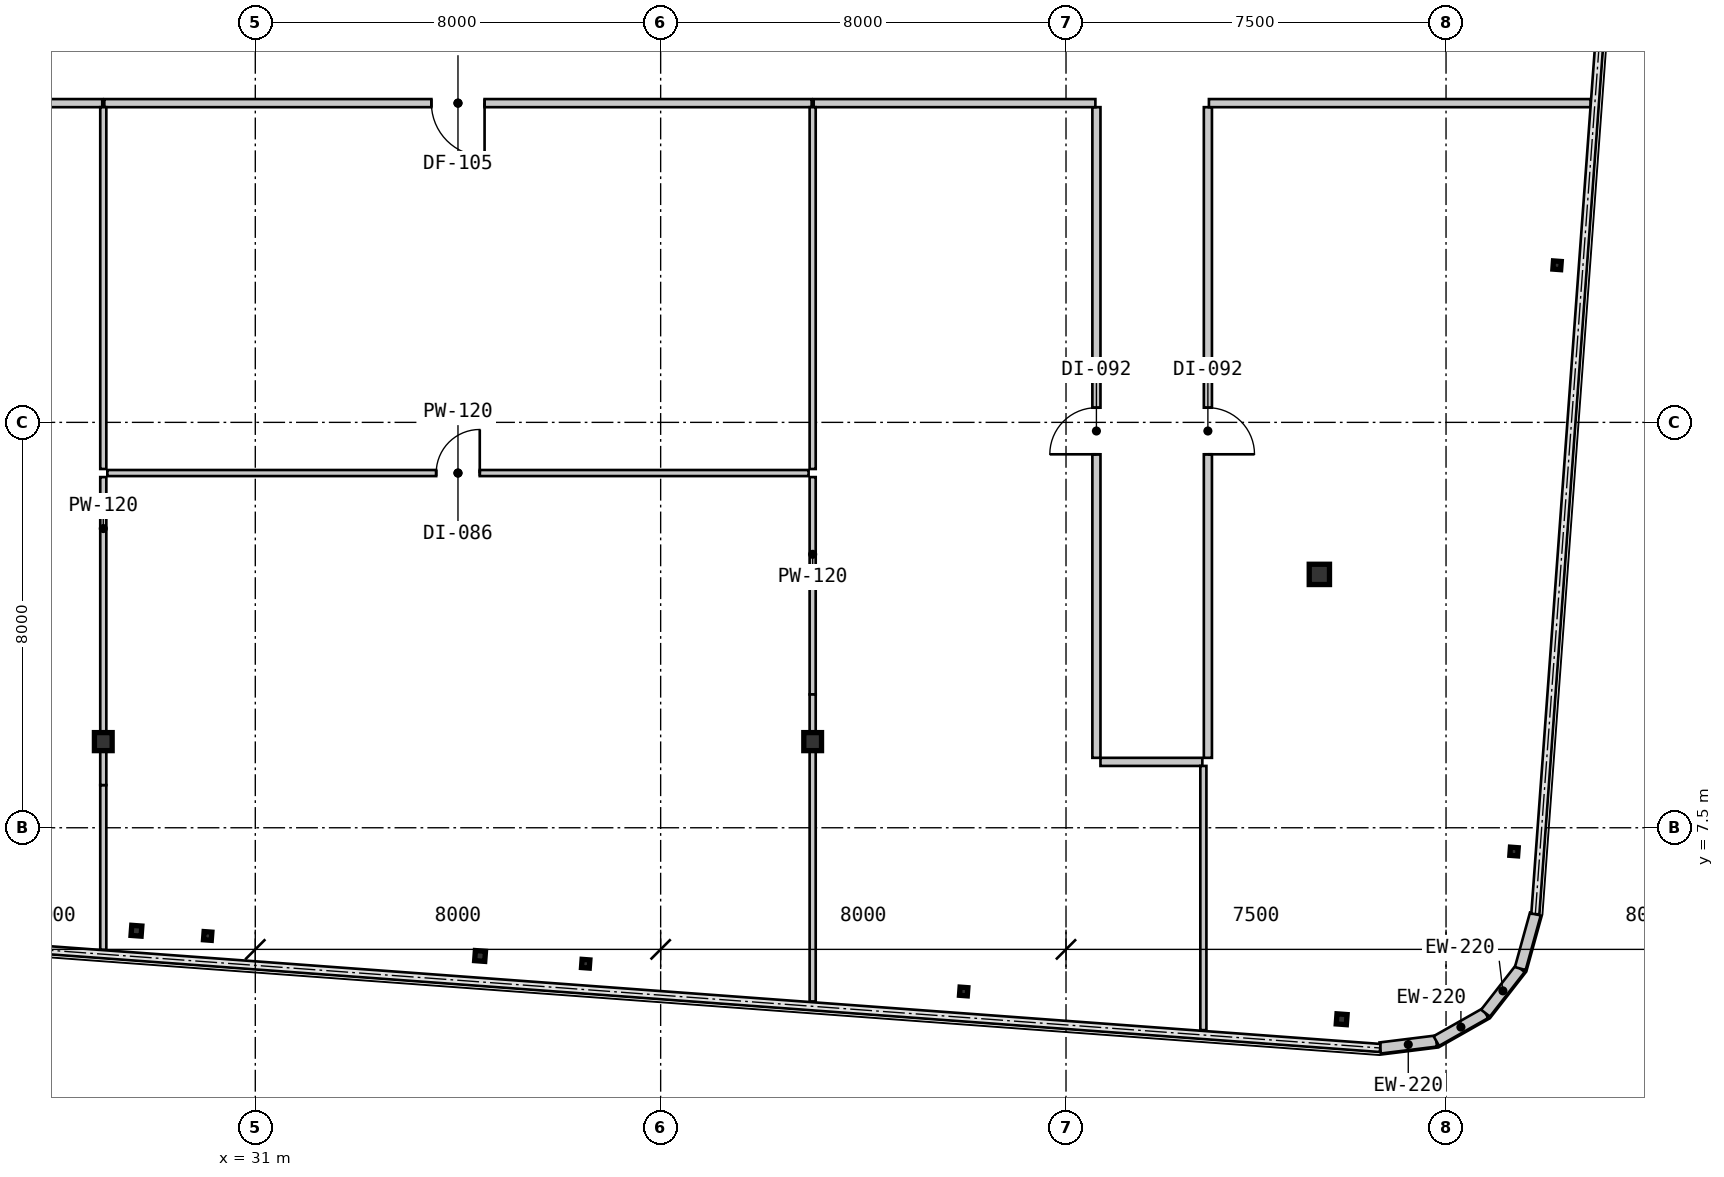
"""IFC4 building model, lengths in metres.
Left out: names, types, materials, properties, quantities, classifications, styles, units other than length and angle.
Written with IfcOpenShell. Run it as: python <this file> out.ifc"""

import sys

from ifc_helpers import new_model, si_unit, direction, frame, frame_2d, origin, origin_2d, place, context, subcontext, project, spatial, rectangle, hollow_rectangle, i_section, extrude, source, transform, mapped, element, fill, save


model = new_model("IFC4")
c1 = context("Model", 3, precision=1e-05, world=origin(), true_north=direction((0.0, 1.0)))
c2 = subcontext(c1, "Body", "Model", "MODEL_VIEW")
j1 = project(units=[si_unit("LENGTHUNIT", "METRE"), si_unit("PLANEANGLEUNIT", "RADIAN")], contexts=[c1])
p1 = place(None, origin())
s1 = spatial("IfcSite", under=j1, at=p1, CompositionType="ELEMENT")
p2 = place(p1, origin())
s2 = spatial("IfcBuilding", under=s1, at=p2, CompositionType="ELEMENT")
p3 = place(p2, frame((0.0, 0.0, 236.6)))
s3 = spatial("IfcBuildingStorey", under=s2, at=p3, CompositionType="ELEMENT", Elevation=236.6)
m1 = source(origin(), c2, "Body", "SweptSolid", [
    extrude(i_section(OverallWidth=0.35, OverallDepth=0.356, WebThickness=0.018, FlangeThickness=0.028, at=origin_2d()), origin(), (0.0, 0.0, 1.0), 3.15),
])
for number, where, z_axis, x_axis in (
    (1, (28.0, 9.2, 0.0), (0.0, 0.0, 1.0), (1.0, 0.0, 0.0)),
    (2, (42.0, 9.2, 0.0), (0.0, 0.0, 1.0), (1.0, 0.0, 0.0)),
):
    element("IfcColumn", number, at=place(p3, frame(where, z_axis=z_axis, x_axis=x_axis)), inside=s3, PredefinedType="COLUMN", context=c2, shape_type="MappedRepresentation", body=[
        mapped(m1, transform((0.0, 0.0, 0.0), scale=1.0)),
    ])
m2 = source(origin(), c2, "Body", "SweptSolid", [
    extrude(hollow_rectangle(XDim=0.4, YDim=0.4, WallThickness=0.016, at=origin_2d()), origin(), (0.0, 0.0, 1.0), 3.15),
])
p4 = place(p3, frame((52.0, 12.5, 0.0), z_axis=(0.0, 0.0, 1.0), x_axis=(1.0, 0.0, 0.0)))
e3 = element("IfcColumn", 3, at=p4, inside=s3, PredefinedType="COLUMN", context=c2, shape_type="MappedRepresentation", body=[
    mapped(m2, transform((0.0, 0.0, 0.0), scale=1.0)),
])
m3 = source(origin(), c2, "Body", "SweptSolid", [
    extrude(i_section(OverallWidth=0.154, OverallDepth=0.162, WebThickness=0.008, FlangeThickness=0.011, at=origin_2d()), origin(), (0.0, 0.0, 1.0), 3.15),
])
for number, where, z_axis, x_axis in (
    (4, (30.061, 5.365, 0.0), (0.0, 0.0, 1.0), (0.997, -0.073, 0.0)),
    (5, (37.521, 4.817, 0.0), (0.0, 0.0, 1.0), (0.997, -0.073, 0.0)),
    (6, (44.98, 4.269, 0.0), (0.0, 0.0, 1.0), (0.997, -0.073, 0.0)),
):
    element("IfcColumn", number, at=place(p3, frame(where, z_axis=z_axis, x_axis=x_axis)), inside=s3, PredefinedType="COLUMN", context=c2, shape_type="MappedRepresentation", body=[
        mapped(m3, transform((0.0, 0.0, 0.0), scale=1.0)),
    ])
m4 = source(origin(), c2, "Body", "SweptSolid", [
    extrude(hollow_rectangle(XDim=0.2, YDim=0.2, WallThickness=0.009, at=origin_2d()), origin(), (0.0, 0.0, 1.0), 3.15),
])
p5 = place(p3, frame((52.44, 3.721, 0.0), z_axis=(0.0, 0.0, 1.0), x_axis=(0.997314477224, -0.073238197128, 0.0)))
e7 = element("IfcColumn", 7, at=p5, inside=s3, PredefinedType="COLUMN", context=c2, shape_type="MappedRepresentation", body=[
    mapped(m4, transform((0.0, 0.0, 0.0), scale=1.0)),
])
for number, where, z_axis, x_axis in (
    (8, (55.842, 7.031, 0.0), (0.0, 0.0, 1.0), (0.997, -0.073, 0.0)),
    (9, (56.691, 18.6, 0.0), (0.0, 0.0, 1.0), (0.997, -0.073, 0.0)),
):
    element("IfcColumn", number, at=place(p3, frame(where, z_axis=z_axis, x_axis=x_axis)), inside=s3, PredefinedType="COLUMN", context=c2, shape_type="MappedRepresentation", body=[
        mapped(m3, transform((0.0, 0.0, 0.0), scale=1.0)),
    ])
for number, where, z_axis, x_axis in (
    (10, (28.654, 5.468, 0.0), (0.0, 0.0, 1.0), (0.997, -0.073, 0.0)),
    (11, (35.436, 4.97, 0.0), (0.0, 0.0, 1.0), (0.997, -0.073, 0.0)),
):
    element("IfcColumn", number, at=place(p3, frame(where, z_axis=z_axis, x_axis=x_axis)), inside=s3, PredefinedType="COLUMN", context=c2, shape_type="MappedRepresentation", body=[
        mapped(m4, transform((0.0, 0.0, 0.0), scale=1.0)),
    ])
m5 = source(origin(), c2, "Body", "SweptSolid", [
    extrude(rectangle(XDim=1.116, YDim=0.22, at=frame_2d((0.558, 0.0))), origin(), (0.0, 0.0, 1.0), 2.93),
])
p6 = place(p3, frame((53.201, 3.154, 0.0), z_axis=(0.0, 0.0, 1.0), x_axis=(0.992438604032, 0.122742076028, 0.0)))
e12 = element("IfcWall", 12, at=p6, inside=s3, PredefinedType="SOLIDWALL", context=c2, shape_type="MappedRepresentation", body=[
    mapped(m5, transform((0.0, 0.0, 0.0), scale=1.0)),
])
m6 = source(origin(), c2, "Body", "SweptSolid", [
    extrude(rectangle(XDim=1.116, YDim=0.22, at=frame_2d((0.558, 0.0))), origin(), (0.0, 0.0, 1.0), 2.93),
])
p7 = place(p3, frame((54.308, 3.291, 0.0), z_axis=(0.0, 0.0, 1.0), x_axis=(0.869893934693, 0.49323882895, 0.0)))
e13 = element("IfcWall", 13, at=p7, inside=s3, PredefinedType="SOLIDWALL", context=c2, shape_type="MappedRepresentation", body=[
    mapped(m6, transform((0.0, 0.0, 0.0), scale=1.0)),
])
for number, where, z_axis, x_axis in (
    (14, (55.279, 3.841, 0.0), (0.0, 0.0, 1.0), (0.615, 0.789, 0.0)),
    (15, (55.965, 4.721, 0.0), (0.0, 0.0, 1.0), (0.266, 0.964, 0.0)),
):
    element("IfcWall", number, at=place(p3, frame(where, z_axis=z_axis, x_axis=x_axis)), inside=s3, PredefinedType="SOLIDWALL", context=c2, shape_type="MappedRepresentation", body=[
        mapped(m5, transform((0.0, 0.0, 0.0), scale=1.0)),
    ])
m7 = source(origin(), c2, "Body", "SweptSolid", [
    extrude(rectangle(XDim=13.959, YDim=0.16, at=frame_2d((6.98, 0.0))), origin(), (0.0, 0.0, 1.0), 2.93),
])
p8 = place(p3, frame((41.98, 21.8, 0.0), z_axis=(0.0, 0.0, 1.0), x_axis=(-1.0, 0.0, 0.0)))
e16 = element("IfcWall", 16, at=p8, inside=s3, PredefinedType="PARTITIONING", context=c2, shape_type="MappedRepresentation", body=[
    mapped(m7, transform((0.0, 0.0, 0.0), scale=1.0)),
])
m8 = source(origin(), c2, "Body", "SweptSolid", [
    extrude(rectangle(XDim=1.05, YDim=2.1, at=frame_2d((0.525, 1.05))), frame((0.0, 0.09, 0.0), z_axis=(0.0, -1.0, 0.0), x_axis=(1.0, 0.0, 0.0)), (0.0, 0.0, 1.0), 0.18),
])
p9 = place(p8, frame((6.455, 0.0, 0.0)))
e17 = element("IfcOpeningElement", 17, at=p9, cuts=e16, PredefinedType="OPENING", context=c2, shape_type="MappedRepresentation", body=[
    mapped(m8, transform((0.0, 0.0, 0.0), scale=1.0)),
])
m9 = source(origin(), c2, "Body", "SweptSolid", [
    extrude(rectangle(XDim=5.559, YDim=0.16, at=frame_2d((2.78, 0.0))), origin(), (0.0, 0.0, 1.0), 2.93),
])
p10 = place(p3, frame((27.98, 21.8, 0.0), z_axis=(0.0, 0.0, 1.0), x_axis=(-1.0, 0.0, 0.0)))
e18 = element("IfcWall", 18, at=p10, inside=s3, PredefinedType="PARTITIONING", context=c2, shape_type="MappedRepresentation", body=[
    mapped(m9, transform((0.0, 0.0, 0.0), scale=1.0)),
])
m10 = source(origin(), c2, "Body", "SweptSolid", [
    extrude(rectangle(XDim=12.84, YDim=0.16, at=frame_2d((6.42, 0.0))), origin(), (0.0, 0.0, 1.0), 2.93),
])
p11 = place(p3, frame((47.6, 8.88, 0.0), z_axis=(0.0, 0.0, 1.0), x_axis=(0.0, 1.0, 0.0)))
e19 = element("IfcWall", 19, at=p11, inside=s3, PredefinedType="PARTITIONING", context=c2, shape_type="MappedRepresentation", body=[
    mapped(m10, transform((0.0, 0.0, 0.0), scale=1.0)),
])
m11 = source(origin(), c2, "Body", "SweptSolid", [
    extrude(rectangle(XDim=0.92, YDim=2.1, at=frame_2d((0.46, 1.05))), frame((0.0, 0.09, 0.0), z_axis=(0.0, -1.0, 0.0), x_axis=(1.0, 0.0, 0.0)), (0.0, 0.0, 1.0), 0.18),
])
p12 = place(p11, frame((5.99, 0.0, 0.0)))
e20 = element("IfcOpeningElement", 20, at=p12, cuts=e19, PredefinedType="OPENING", context=c2, shape_type="MappedRepresentation", body=[
    mapped(m11, transform((0.0, 0.0, 0.0), scale=1.0)),
])
p13 = place(p3, frame((47.58, 21.8, 0.0), z_axis=(0.0, 0.0, 1.0), x_axis=(-1.0, 0.0, 0.0)))
e21 = element("IfcWall", 21, at=p13, inside=s3, PredefinedType="PARTITIONING", context=c2, shape_type="MappedRepresentation", body=[
    mapped(m9, transform((0.0, 0.0, 0.0), scale=1.0)),
])
m12 = source(origin(), c2, "Body", "SweptSolid", [
    extrude(rectangle(XDim=2.011, YDim=0.16, at=frame_2d((1.005, 0.0))), origin(), (0.0, 0.0, 1.0), 2.93),
])
p14 = place(p3, frame((49.691, 8.8, 0.0), z_axis=(0.0, 0.0, 1.0), x_axis=(-1.0, 0.0, 0.0)))
e22 = element("IfcWall", 22, at=p14, inside=s3, PredefinedType="PARTITIONING", context=c2, shape_type="MappedRepresentation", body=[
    mapped(m12, transform((0.0, 0.0, 0.0), scale=1.0)),
])
p15 = place(p3, frame((49.8, 21.72, 0.0), z_axis=(0.0, 0.0, 1.0), x_axis=(0.0, -1.0, 0.0)))
e23 = element("IfcWall", 23, at=p15, inside=s3, PredefinedType="PARTITIONING", context=c2, shape_type="MappedRepresentation", body=[
    mapped(m10, transform((0.0, 0.0, 0.0), scale=1.0)),
])
p16 = place(p15, frame((5.93, 0.0, 0.0)))
e24 = element("IfcOpeningElement", 24, at=p16, cuts=e23, PredefinedType="OPENING", context=c2, shape_type="MappedRepresentation", body=[
    mapped(m11, transform((0.0, 0.0, 0.0), scale=1.0)),
])
m13 = source(origin(), c2, "Body", "SweptSolid", [
    extrude(rectangle(XDim=7.533, YDim=0.16, at=frame_2d((3.767, 0.0))), origin(), (0.0, 0.0, 1.0), 2.93),
])
p17 = place(p3, frame((57.353, 21.8, 0.0), z_axis=(0.0, 0.0, 1.0), x_axis=(-1.0, 0.0, 0.0)))
e25 = element("IfcWall", 25, at=p17, inside=s3, PredefinedType="PARTITIONING", context=c2, shape_type="MappedRepresentation", body=[
    mapped(m13, transform((0.0, 0.0, 0.0), scale=1.0)),
])
m14 = source(origin(), c2, "Body", "SweptSolid", [
    extrude(rectangle(XDim=13.84, YDim=0.12, at=frame_2d((6.92, 0.0))), origin(), (0.0, 0.0, 1.0), 2.93),
])
p18 = place(p3, frame((28.08, 14.5, 0.0), z_axis=(0.0, 0.0, 1.0), x_axis=(1.0, 0.0, 0.0)))
e26 = element("IfcWall", 26, at=p18, inside=s3, PredefinedType="PARTITIONING", context=c2, shape_type="MappedRepresentation", body=[
    mapped(m14, transform((0.0, 0.0, 0.0), scale=1.0)),
])
m15 = source(origin(), c2, "Body", "SweptSolid", [
    extrude(rectangle(XDim=0.86, YDim=2.1, at=frame_2d((0.43, 1.05))), frame((0.0, 0.07, 0.0), z_axis=(0.0, -1.0, 0.0), x_axis=(1.0, 0.0, 0.0)), (0.0, 0.0, 1.0), 0.14),
])
p19 = place(p18, frame((6.49, 0.0, 0.0)))
e27 = element("IfcOpeningElement", 27, at=p19, cuts=e26, PredefinedType="OPENING", context=c2, shape_type="MappedRepresentation", body=[
    mapped(m15, transform((0.0, 0.0, 0.0), scale=1.0)),
])
m16 = source(origin(), c2, "Body", "SweptSolid", [
    extrude(rectangle(XDim=3.253, YDim=0.12, at=frame_2d((1.627, 0.0))), origin(), (0.0, 0.0, 1.0), 2.93),
])
p20 = place(p3, frame((28.0, 5.089, 0.0), z_axis=(0.0, 0.0, 1.0), x_axis=(0.0, 1.0, 0.0)))
e28 = element("IfcWall", 28, at=p20, inside=s3, PredefinedType="PARTITIONING", context=c2, shape_type="MappedRepresentation", body=[
    mapped(m16, transform((0.0, 0.0, 0.0), scale=1.0)),
])
m17 = source(origin(), c2, "Body", "SweptSolid", [
    extrude(rectangle(XDim=0.858, YDim=0.12, at=frame_2d((0.429, 0.0))), origin(), (0.0, 0.0, 1.0), 2.524),
])
p21 = place(p3, frame((28.0, 8.342, 0.0), z_axis=(0.0, 0.0, 1.0), x_axis=(0.0, 1.0, 0.0)))
e29 = element("IfcWall", 29, at=p21, inside=s3, PredefinedType="PARTITIONING", context=c2, shape_type="MappedRepresentation", body=[
    mapped(m17, transform((0.0, 0.0, 0.0), scale=1.0)),
])
m18 = source(origin(), c2, "Body", "SweptSolid", [
    extrude(rectangle(XDim=5.22, YDim=0.12, at=frame_2d((2.61, 0.0))), origin(), (0.0, 0.0, 1.0), 2.328),
])
p22 = place(p3, frame((28.0, 9.2, 0.0), z_axis=(0.0, 0.0, 1.0), x_axis=(0.0, 1.0, 0.0)))
e30 = element("IfcWall", 30, at=p22, inside=s3, PredefinedType="PARTITIONING", context=c2, shape_type="MappedRepresentation", body=[
    mapped(m18, transform((0.0, 0.0, 0.0), scale=1.0)),
])
m19 = source(origin(), c2, "Body", "SweptSolid", [
    extrude(rectangle(XDim=4.29, YDim=0.12, at=frame_2d((2.145, 0.0))), origin(), (0.0, 0.0, 1.0), 2.93),
])
p23 = place(p3, frame((42.0, 14.42, 0.0), z_axis=(0.0, 0.0, 1.0), x_axis=(0.0, -1.0, 0.0)))
e31 = element("IfcWall", 31, at=p23, inside=s3, PredefinedType="PARTITIONING", context=c2, shape_type="MappedRepresentation", body=[
    mapped(m19, transform((0.0, 0.0, 0.0), scale=1.0)),
])
m20 = source(origin(), c2, "Body", "SweptSolid", [
    extrude(rectangle(XDim=0.942, YDim=0.12, at=frame_2d((0.471, 0.0))), origin(), (0.0, 0.0, 1.0), 2.328),
])
p24 = place(p3, frame((42.0, 10.13, 0.0), z_axis=(0.0, 0.0, 1.0), x_axis=(0.0, -1.0, 0.0)))
e32 = element("IfcWall", 32, at=p24, inside=s3, PredefinedType="PARTITIONING", context=c2, shape_type="MappedRepresentation", body=[
    mapped(m20, transform((0.0, 0.0, 0.0), scale=1.0)),
])
m21 = source(origin(), c2, "Body", "SweptSolid", [
    extrude(rectangle(XDim=5.116, YDim=0.12, at=frame_2d((2.558, 0.0))), origin(), (0.0, 0.0, 1.0), 2.93),
])
p25 = place(p3, frame((42.0, 9.189, 0.0), z_axis=(0.0, 0.0, 1.0), x_axis=(0.0, -1.0, 0.0)))
e33 = element("IfcWall", 33, at=p25, inside=s3, PredefinedType="PARTITIONING", context=c2, shape_type="MappedRepresentation", body=[
    mapped(m21, transform((0.0, 0.0, 0.0), scale=1.0)),
])
m22 = source(origin(), c2, "Body", "SweptSolid", [
    extrude(rectangle(XDim=7.14, YDim=0.12, at=frame_2d((3.57, 0.0))), origin(), (0.0, 0.0, 1.0), 2.328),
])
p26 = place(p3, frame((28.0, 14.58, 0.0), z_axis=(0.0, 0.0, 1.0), x_axis=(0.0, 1.0, 0.0)))
e34 = element("IfcWall", 34, at=p26, inside=s3, PredefinedType="PARTITIONING", context=c2, shape_type="MappedRepresentation", body=[
    mapped(m22, transform((0.0, 0.0, 0.0), scale=1.0)),
])
m23 = source(origin(), c2, "Body", "SweptSolid", [
    extrude(rectangle(XDim=7.14, YDim=0.12, at=frame_2d((3.57, 0.0))), origin(), (0.0, 0.0, 1.0), 2.93),
])
p27 = place(p3, frame((42.0, 21.72, 0.0), z_axis=(0.0, 0.0, 1.0), x_axis=(0.0, -1.0, 0.0)))
e35 = element("IfcWall", 35, at=p27, inside=s3, PredefinedType="PARTITIONING", context=c2, shape_type="MappedRepresentation", body=[
    mapped(m23, transform((0.0, 0.0, 0.0), scale=1.0)),
])
m24 = source(origin(), c2, "Body", "SweptSolid", [
    extrude(rectangle(XDim=5.214, YDim=0.12, at=frame_2d((2.607, 0.0))), origin(), (0.0, 0.0, 1.0), 2.93),
])
p28 = place(p3, frame((49.711, 8.72, 0.0), z_axis=(0.0, 0.0, 1.0), x_axis=(0.0, -1.0, 0.0)))
e36 = element("IfcWall", 36, at=p28, inside=s3, PredefinedType="PARTITIONING", context=c2, shape_type="MappedRepresentation", body=[
    mapped(m24, transform((0.0, 0.0, 0.0), scale=1.0)),
])
m25 = source(origin(), c2, "Body", "SweptSolid", [
    extrude(rectangle(XDim=1.05, YDim=2.1, at=frame_2d((0.525, 1.05))), frame((0.0, 0.025, 0.0), z_axis=(0.0, -1.0, 0.0), x_axis=(1.0, 0.0, 0.0)), (0.0, 0.0, 1.0), 0.05),
])
p29 = place(p9, origin())
e37 = element("IfcDoor", 37, at=p29, inside=s3, OperationType="SINGLE_SWING_LEFT", PredefinedType="DOOR", context=c2, shape_type="MappedRepresentation", body=[
    mapped(m25, transform((0.0, 0.0, 0.0), scale=1.0)),
])
fill(e17, e37)
m26 = source(origin(), c2, "Body", "SweptSolid", [
    extrude(rectangle(XDim=0.92, YDim=2.1, at=frame_2d((0.46, 1.05))), frame((0.0, 0.025, 0.0), z_axis=(0.0, -1.0, 0.0), x_axis=(1.0, 0.0, 0.0)), (0.0, 0.0, 1.0), 0.05),
])
p30 = place(p12, origin())
e38 = element("IfcDoor", 38, at=p30, inside=s3, OperationType="SINGLE_SWING_LEFT", PredefinedType="DOOR", context=c2, shape_type="MappedRepresentation", body=[
    mapped(m26, transform((0.0, 0.0, 0.0), scale=1.0)),
])
fill(e20, e38)
p31 = place(p16, origin())
e39 = element("IfcDoor", 39, at=p31, inside=s3, OperationType="SINGLE_SWING_RIGHT", PredefinedType="DOOR", context=c2, shape_type="MappedRepresentation", body=[
    mapped(m26, transform((0.0, 0.0, 0.0), scale=1.0)),
])
fill(e24, e39)
m27 = source(origin(), c2, "Body", "SweptSolid", [
    extrude(rectangle(XDim=0.86, YDim=2.1, at=frame_2d((0.43, 1.05))), frame((0.0, 0.025, 0.0), z_axis=(0.0, -1.0, 0.0), x_axis=(1.0, 0.0, 0.0)), (0.0, 0.0, 1.0), 0.05),
])
p32 = place(p19, origin())
e40 = element("IfcDoor", 40, at=p32, inside=s3, OperationType="SINGLE_SWING_RIGHT", PredefinedType="DOOR", context=c2, shape_type="MappedRepresentation", body=[
    mapped(m27, transform((0.0, 0.0, 0.0), scale=1.0)),
])
fill(e27, e40)
save(model, sys.argv[1])
